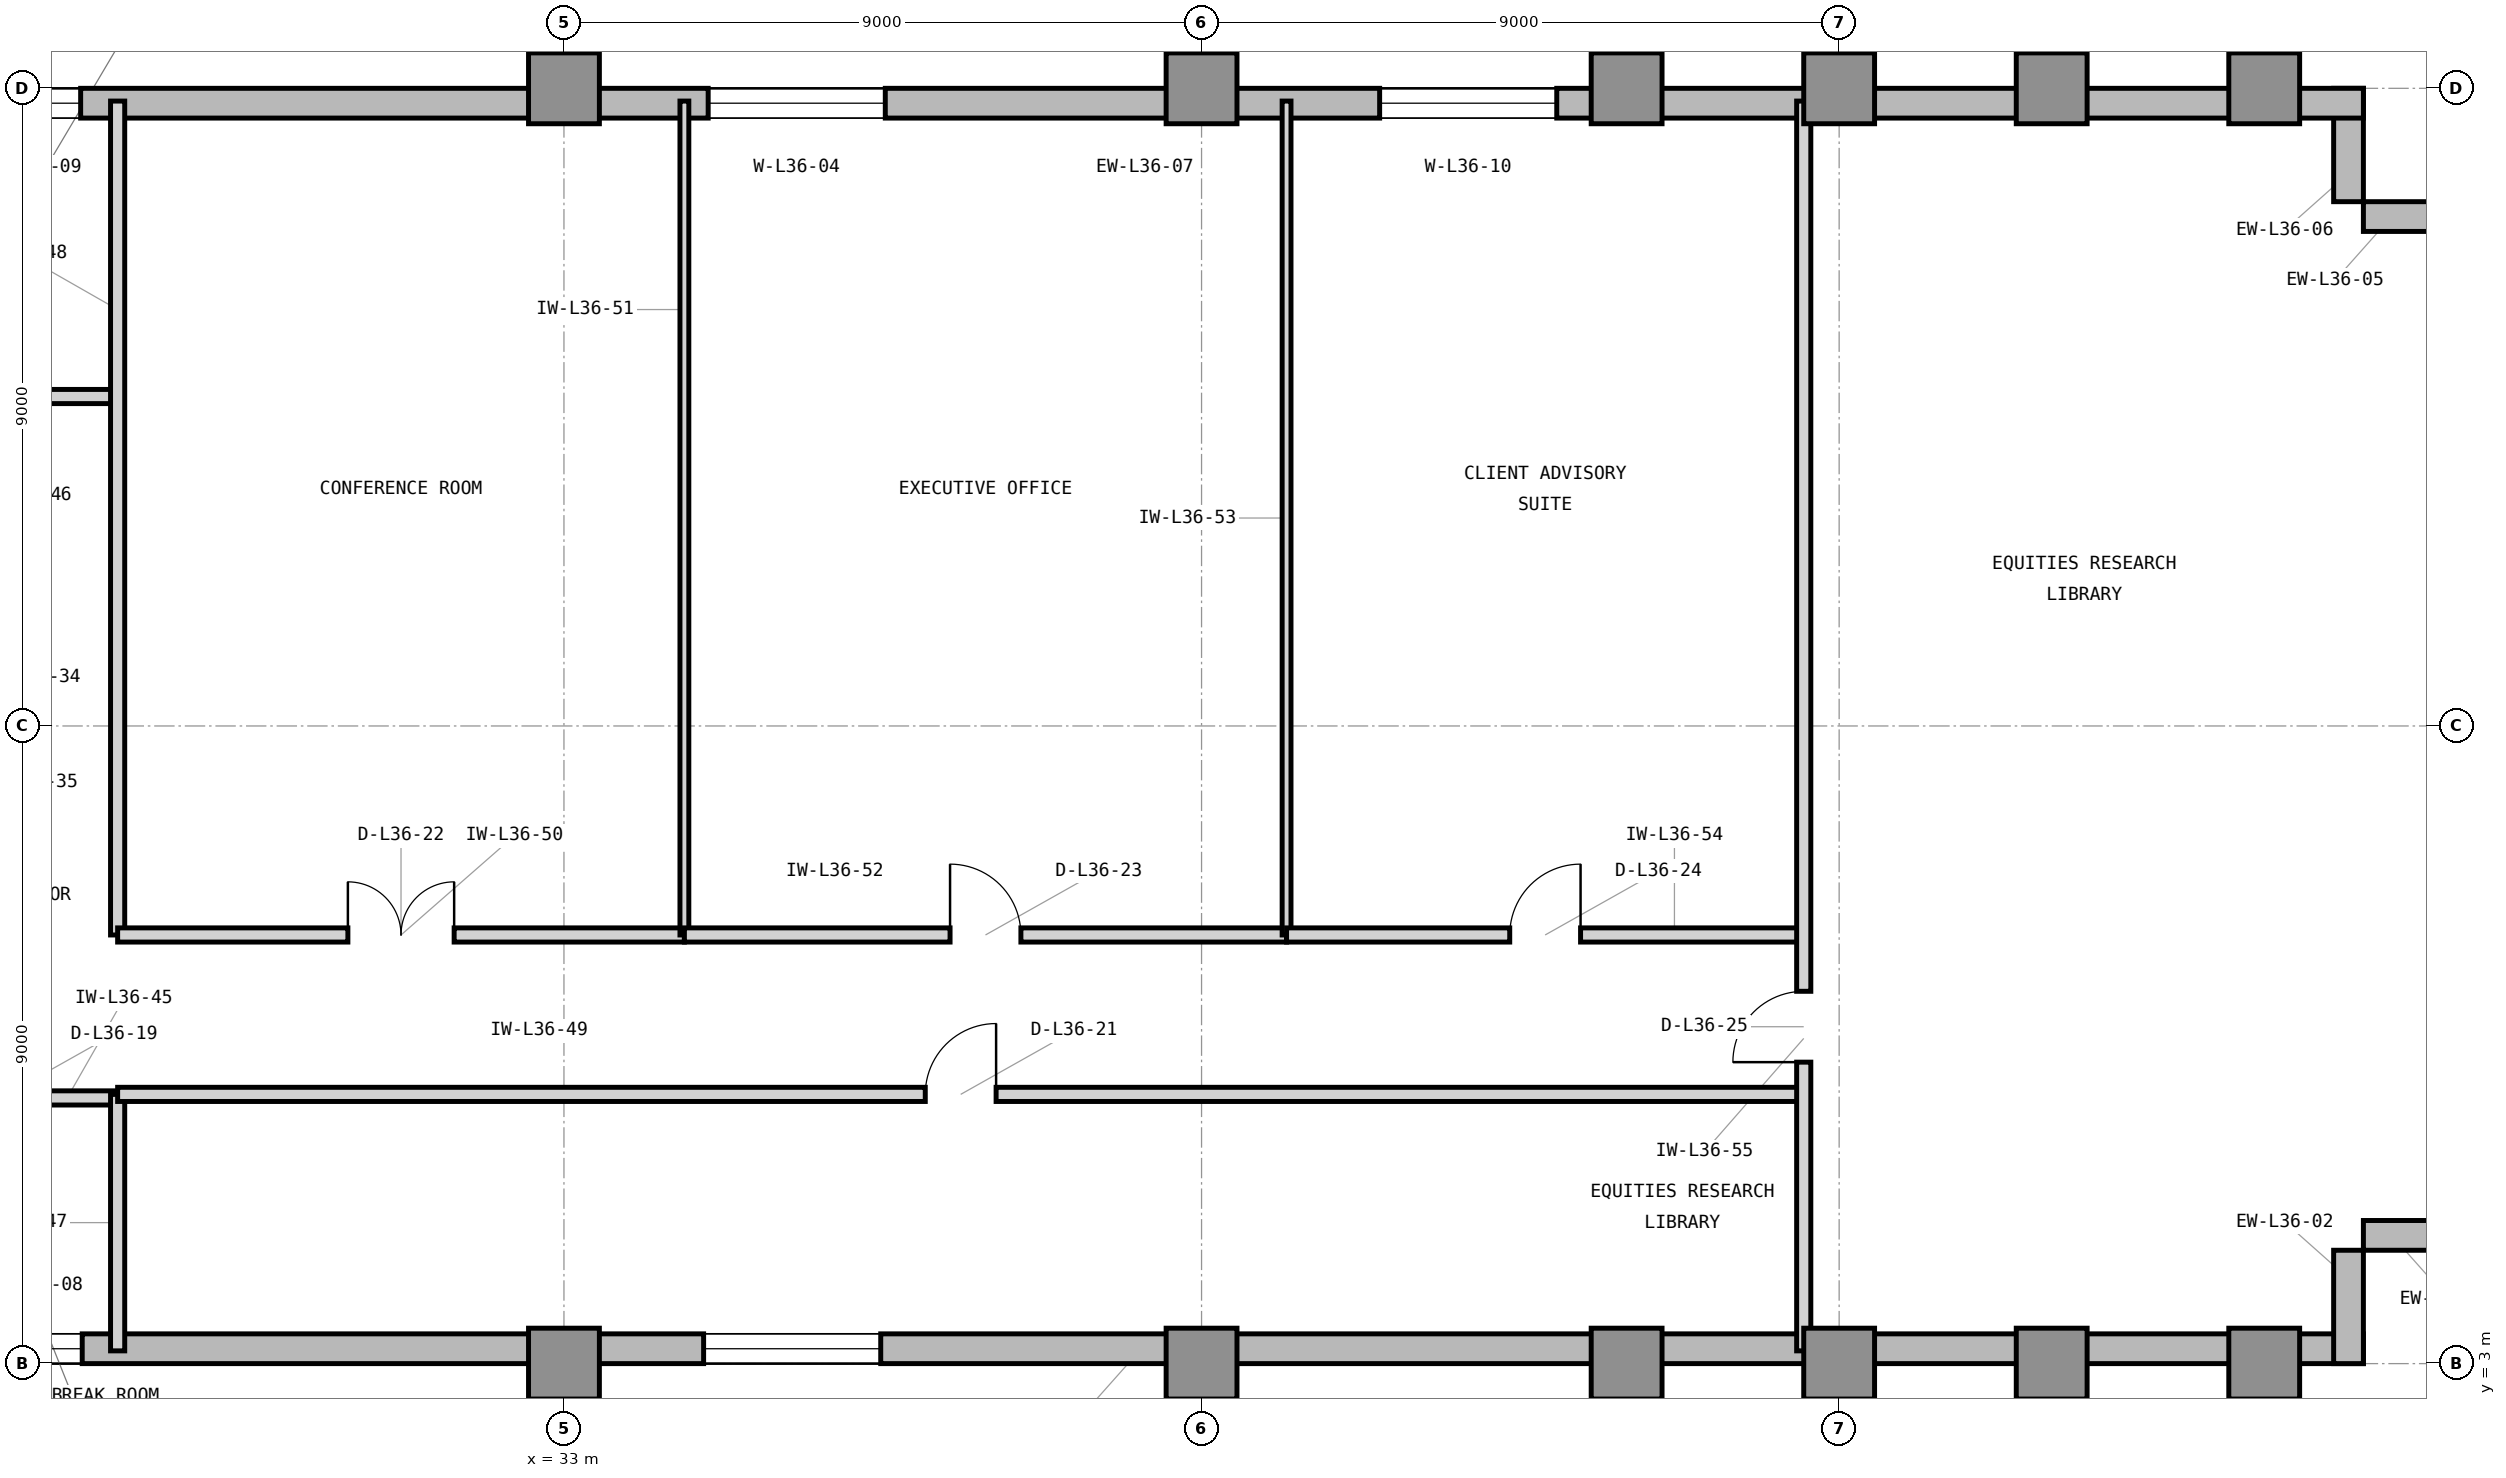
"""IFC4 building model, lengths in metres.
Left out: names, types, materials, properties, quantities, classifications, styles, units other than length and angle.
Written with IfcOpenShell. Run it as: python <this file> out.ifc"""

import sys

from ifc_helpers import new_model, si_unit, direction, frame, frame_2d, origin, origin_2d, place, context, subcontext, project, spatial, rectangle, extrude, element, fill, save


model = new_model("IFC4")
c1 = context("Model", 3, precision=1e-05, world=origin(), true_north=direction((0.0, 1.0)))
c2 = subcontext(c1, "Body", "Model", "MODEL_VIEW")
j1 = project(units=[si_unit("LENGTHUNIT", "METRE"), si_unit("PLANEANGLEUNIT", "RADIAN")], contexts=[c1])
p1 = place(None, origin())
s1 = spatial("IfcSite", under=j1, at=p1, CompositionType="ELEMENT")
p2 = place(p1, origin())
s2 = spatial("IfcBuilding", under=s1, at=p2, CompositionType="ELEMENT")
p3 = place(p2, frame((0.0, 0.0, 151.8)))
s3 = spatial("IfcBuildingStorey", under=s2, at=p3, CompositionType="ELEMENT", Elevation=151.8)
for number, where, z_axis, x_axis in (
    (1, (33.0, 3.0, 0.0), (0.0, 0.0, 1.0), (1.0, 0.0, 0.0)),
    (2, (33.0, 21.0, 0.0), (0.0, 0.0, 1.0), (1.0, 0.0, 0.0)),
    (3, (42.0, 3.0, 0.0), (0.0, 0.0, 1.0), (1.0, 0.0, 0.0)),
    (4, (42.0, 21.0, 0.0), (0.0, 0.0, 1.0), (1.0, 0.0, 0.0)),
    (5, (48.0, 3.0, 0.0), (0.0, 0.0, 1.0), (1.0, 0.0, 0.0)),
    (6, (48.0, 21.0, 0.0), (0.0, 0.0, 1.0), (1.0, 0.0, 0.0)),
    (7, (51.0, 3.0, 0.0), (0.0, 0.0, 1.0), (1.0, 0.0, 0.0)),
    (8, (51.0, 21.0, 0.0), (0.0, 0.0, 1.0), (1.0, 0.0, 0.0)),
    (9, (54.0, 3.0, 0.0), (0.0, 0.0, 1.0), (1.0, 0.0, 0.0)),
    (10, (54.0, 21.0, 0.0), (0.0, 0.0, 1.0), (1.0, 0.0, 0.0)),
    (11, (57.0, 3.0, 0.0), (0.0, 0.0, 1.0), (1.0, 0.0, 0.0)),
    (12, (57.0, 21.0, 0.0), (0.0, 0.0, 1.0), (1.0, 0.0, 0.0)),
):
    element("IfcColumn", number, at=place(p3, frame(where, z_axis=z_axis, x_axis=x_axis)), inside=s3, PredefinedType="COLUMN", context=c2, shape_type="SweptSolid", body=[
        extrude(rectangle(XDim=1.0, YDim=1.0, at=origin_2d()), origin(), (0.0, 0.0, 1.0), 3.9),
    ])
p4 = place(p3, frame((23.9, 3.21, 0.0), z_axis=(0.0, 0.0, 1.0), x_axis=(1.0, 0.0, 0.0)))
e13 = element("IfcWall", 13, at=p4, inside=s3, PredefinedType="STANDARD", context=c2, shape_type="SweptSolid", body=[
    extrude(rectangle(XDim=34.5, YDim=0.42, at=frame_2d((17.25, 0.0))), origin(), (0.0, 0.0, 1.0), 3.62),
])
p5 = place(p4, frame((11.071, 0.0, 0.85)))
e14 = element("IfcOpeningElement", 14, at=p5, cuts=e13, PredefinedType="OPENING", context=c2, shape_type="SweptSolid", body=[
    extrude(rectangle(XDim=2.5, YDim=2.25, at=frame_2d((1.25, 1.125))), frame((0.0, 0.22, 0.0), z_axis=(0.0, -1.0, 0.0), x_axis=(1.0, 0.0, 0.0)), (0.0, 0.0, 1.0), 0.44),
])
p6 = place(p4, frame((1.1, 0.0, 0.85)))
e15 = element("IfcOpeningElement", 15, at=p6, cuts=e13, PredefinedType="OPENING", context=c2, shape_type="SweptSolid", body=[
    extrude(rectangle(XDim=1.2, YDim=2.25, at=frame_2d((0.6, 1.125))), frame((0.0, 0.22, 0.0), z_axis=(0.0, -1.0, 0.0), x_axis=(1.0, 0.0, 0.0)), (0.0, 0.0, 1.0), 0.44),
])
for number, where, z_axis, x_axis in (
    (16, (58.19, 3.0, 0.0), (0.0, 0.0, 1.0), (0.0, 1.0, 0.0)),
    (17, (58.4, 4.81, 0.0), (0.0, 0.0, 1.0), (1.0, 0.0, 0.0)),
    (18, (60.0, 19.19, 0.0), (0.0, 0.0, 1.0), (-1.0, 0.0, 0.0)),
    (19, (58.19, 19.4, 0.0), (0.0, 0.0, 1.0), (0.0, 1.0, 0.0)),
):
    element("IfcWall", number, at=place(p3, frame(where, z_axis=z_axis, x_axis=x_axis)), inside=s3, PredefinedType="STANDARD", context=c2, shape_type="SweptSolid", body=[
        extrude(rectangle(XDim=1.6, YDim=0.42, at=frame_2d((0.8, 0.0))), origin(), (0.0, 0.0, 1.0), 3.62),
    ])
p7 = place(p3, frame((58.4, 20.79, 0.0), z_axis=(0.0, 0.0, 1.0), x_axis=(-1.0, 0.0, 0.0)))
e20 = element("IfcWall", 20, at=p7, inside=s3, PredefinedType="STANDARD", context=c2, shape_type="SweptSolid", body=[
    extrude(rectangle(XDim=34.4, YDim=0.42, at=frame_2d((17.2, 0.0))), origin(), (0.0, 0.0, 1.0), 3.62),
])
p8 = place(p7, frame((20.864, 0.0, 0.85)))
e21 = element("IfcOpeningElement", 21, at=p8, cuts=e20, PredefinedType="OPENING", context=c2, shape_type="SweptSolid", body=[
    extrude(rectangle(XDim=2.5, YDim=2.25, at=frame_2d((1.25, 1.125))), frame((0.0, 0.22, 0.0), z_axis=(0.0, -1.0, 0.0), x_axis=(1.0, 0.0, 0.0)), (0.0, 0.0, 1.0), 0.44),
])
p9 = place(p7, frame((32.222, 0.0, 0.85)))
e22 = element("IfcOpeningElement", 22, at=p9, cuts=e20, PredefinedType="OPENING", context=c2, shape_type="SweptSolid", body=[
    extrude(rectangle(XDim=1.2, YDim=2.25, at=frame_2d((0.6, 1.125))), frame((0.0, 0.22, 0.0), z_axis=(0.0, -1.0, 0.0), x_axis=(1.0, 0.0, 0.0)), (0.0, 0.0, 1.0), 0.44),
])
p10 = place(p7, frame((11.386, 0.0, 0.85)))
e23 = element("IfcOpeningElement", 23, at=p10, cuts=e20, PredefinedType="OPENING", context=c2, shape_type="SweptSolid", body=[
    extrude(rectangle(XDim=2.5, YDim=2.25, at=frame_2d((1.25, 1.125))), frame((0.0, 0.22, 0.0), z_axis=(0.0, -1.0, 0.0), x_axis=(1.0, 0.0, 0.0)), (0.0, 0.0, 1.0), 0.44),
])
p11 = place(p3, frame((23.85, 6.75, 0.0), z_axis=(0.0, 0.0, 1.0), x_axis=(1.0, 0.0, 0.0)))
e24 = element("IfcWall", 24, at=p11, inside=s3, PredefinedType="PARTITIONING", context=c2, shape_type="SweptSolid", body=[
    extrude(rectangle(XDim=2.85, YDim=0.2, at=frame_2d((1.425, 0.0))), origin(), (0.0, 0.0, 1.0), 3.61),
])
p12 = place(p11, frame((0.7, 0.0, 0.0)))
e25 = element("IfcOpeningElement", 25, at=p12, cuts=e24, PredefinedType="OPENING", context=c2, shape_type="SweptSolid", body=[
    extrude(rectangle(XDim=1.0, YDim=2.15, at=frame_2d((0.5, 1.075))), frame((0.0, 0.11, 0.0), z_axis=(0.0, -1.0, 0.0), x_axis=(1.0, 0.0, 0.0)), (0.0, 0.0, 1.0), 0.22),
])
p13 = place(p3, frame((23.85, 16.65, 0.0), z_axis=(0.0, 0.0, 1.0), x_axis=(1.0, 0.0, 0.0)))
e26 = element("IfcWall", 26, at=p13, inside=s3, PredefinedType="PARTITIONING", context=c2, shape_type="SweptSolid", body=[
    extrude(rectangle(XDim=2.85, YDim=0.2, at=frame_2d((1.425, 0.0))), origin(), (0.0, 0.0, 1.0), 3.61),
])
p14 = place(p13, frame((0.7, 0.0, 0.0)))
e27 = element("IfcOpeningElement", 27, at=p14, cuts=e26, PredefinedType="OPENING", context=c2, shape_type="SweptSolid", body=[
    extrude(rectangle(XDim=1.0, YDim=2.15, at=frame_2d((0.5, 1.075))), frame((0.0, 0.11, 0.0), z_axis=(0.0, -1.0, 0.0), x_axis=(1.0, 0.0, 0.0)), (0.0, 0.0, 1.0), 0.22),
])
p15 = place(p3, frame((26.7, 3.18, 0.0), z_axis=(0.0, 0.0, 1.0), x_axis=(0.0, 1.0, 0.0)))
e28 = element("IfcWall", 28, at=p15, inside=s3, PredefinedType="PARTITIONING", context=c2, shape_type="SweptSolid", body=[
    extrude(rectangle(XDim=3.62, YDim=0.2, at=frame_2d((1.81, 0.0))), origin(), (0.0, 0.0, 1.0), 3.61),
])
p16 = place(p3, frame((26.7, 9.05, 0.0), z_axis=(0.0, 0.0, 1.0), x_axis=(0.0, 1.0, 0.0)))
e29 = element("IfcWall", 29, at=p16, inside=s3, PredefinedType="PARTITIONING", context=c2, shape_type="SweptSolid", body=[
    extrude(rectangle(XDim=11.77, YDim=0.2, at=frame_2d((5.885, 0.0))), origin(), (0.0, 0.0, 1.0), 3.61),
])
p17 = place(p3, frame((26.7, 6.8, 0.0), z_axis=(0.0, 0.0, 1.0), x_axis=(1.0, 0.0, 0.0)))
e30 = element("IfcWall", 30, at=p17, inside=s3, PredefinedType="PARTITIONING", context=c2, shape_type="SweptSolid", body=[
    extrude(rectangle(XDim=23.8, YDim=0.2, at=frame_2d((11.9, 0.0))), origin(), (0.0, 0.0, 1.0), 3.61),
])
p18 = place(p17, frame((11.4, 0.0, 0.0)))
e31 = element("IfcOpeningElement", 31, at=p18, cuts=e30, PredefinedType="OPENING", context=c2, shape_type="SweptSolid", body=[
    extrude(rectangle(XDim=1.0, YDim=2.15, at=frame_2d((0.5, 1.075))), frame((0.0, 0.11, 0.0), z_axis=(0.0, -1.0, 0.0), x_axis=(1.0, 0.0, 0.0)), (0.0, 0.0, 1.0), 0.22),
])
p19 = place(p3, frame((26.7, 9.05, 0.0), z_axis=(0.0, 0.0, 1.0), x_axis=(1.0, 0.0, 0.0)))
e32 = element("IfcWall", 32, at=p19, inside=s3, PredefinedType="PARTITIONING", context=c2, shape_type="SweptSolid", body=[
    extrude(rectangle(XDim=8.0, YDim=0.2, at=frame_2d((4.0, 0.0))), origin(), (0.0, 0.0, 1.0), 3.066),
])
p20 = place(p19, frame((3.25, 0.0, 0.0)))
e33 = element("IfcOpeningElement", 33, at=p20, cuts=e32, PredefinedType="OPENING", context=c2, shape_type="SweptSolid", body=[
    extrude(rectangle(XDim=1.5, YDim=2.3, at=frame_2d((0.75, 1.15))), frame((0.0, 0.11, 0.0), z_axis=(0.0, -1.0, 0.0), x_axis=(1.0, 0.0, 0.0)), (0.0, 0.0, 1.0), 0.22),
])
p21 = place(p3, frame((34.7, 9.05, 0.0), z_axis=(0.0, 0.0, 1.0), x_axis=(0.0, 1.0, 0.0)))
e34 = element("IfcWall", 34, at=p21, inside=s3, PredefinedType="PARTITIONING", context=c2, shape_type="SweptSolid", body=[
    extrude(rectangle(XDim=11.77, YDim=0.125, at=frame_2d((5.885, 0.0))), origin(), (0.0, 0.0, 1.0), 3.61),
])
p22 = place(p3, frame((34.7, 9.05, 0.0), z_axis=(0.0, 0.0, 1.0), x_axis=(1.0, 0.0, 0.0)))
e35 = element("IfcWall", 35, at=p22, inside=s3, PredefinedType="PARTITIONING", context=c2, shape_type="SweptSolid", body=[
    extrude(rectangle(XDim=8.5, YDim=0.2, at=frame_2d((4.25, 0.0))), origin(), (0.0, 0.0, 1.0), 3.066),
])
p23 = place(p22, frame((3.75, 0.0, 0.0)))
e36 = element("IfcOpeningElement", 36, at=p23, cuts=e35, PredefinedType="OPENING", context=c2, shape_type="SweptSolid", body=[
    extrude(rectangle(XDim=1.0, YDim=2.15, at=frame_2d((0.5, 1.075))), frame((0.0, 0.11, 0.0), z_axis=(0.0, -1.0, 0.0), x_axis=(1.0, 0.0, 0.0)), (0.0, 0.0, 1.0), 0.22),
])
p24 = place(p3, frame((43.2, 9.05, 0.0), z_axis=(0.0, 0.0, 1.0), x_axis=(0.0, 1.0, 0.0)))
e37 = element("IfcWall", 37, at=p24, inside=s3, PredefinedType="PARTITIONING", context=c2, shape_type="SweptSolid", body=[
    extrude(rectangle(XDim=11.77, YDim=0.125, at=frame_2d((5.885, 0.0))), origin(), (0.0, 0.0, 1.0), 3.61),
])
p25 = place(p3, frame((43.2, 9.05, 0.0), z_axis=(0.0, 0.0, 1.0), x_axis=(1.0, 0.0, 0.0)))
e38 = element("IfcWall", 38, at=p25, inside=s3, PredefinedType="PARTITIONING", context=c2, shape_type="SweptSolid", body=[
    extrude(rectangle(XDim=7.3, YDim=0.2, at=frame_2d((3.65, 0.0))), origin(), (0.0, 0.0, 1.0), 3.066),
])
p26 = place(p25, frame((3.15, 0.0, 0.0)))
e39 = element("IfcOpeningElement", 39, at=p26, cuts=e38, PredefinedType="OPENING", context=c2, shape_type="SweptSolid", body=[
    extrude(rectangle(XDim=1.0, YDim=2.15, at=frame_2d((0.5, 1.075))), frame((0.0, 0.11, 0.0), z_axis=(0.0, -1.0, 0.0), x_axis=(1.0, 0.0, 0.0)), (0.0, 0.0, 1.0), 0.22),
])
p27 = place(p3, frame((50.5, 3.18, 0.0), z_axis=(0.0, 0.0, 1.0), x_axis=(0.0, 1.0, 0.0)))
e40 = element("IfcWall", 40, at=p27, inside=s3, PredefinedType="PARTITIONING", context=c2, shape_type="SweptSolid", body=[
    extrude(rectangle(XDim=17.64, YDim=0.2, at=frame_2d((8.82, 0.0))), origin(), (0.0, 0.0, 1.0), 3.61),
])
p28 = place(p27, frame((4.075, 0.0, 0.0)))
e41 = element("IfcOpeningElement", 41, at=p28, cuts=e40, PredefinedType="OPENING", context=c2, shape_type="SweptSolid", body=[
    extrude(rectangle(XDim=1.0, YDim=2.15, at=frame_2d((0.5, 1.075))), frame((0.0, 0.11, 0.0), z_axis=(0.0, -1.0, 0.0), x_axis=(1.0, 0.0, 0.0)), (0.0, 0.0, 1.0), 0.22),
])
p29 = place(p5, origin())
e42 = element("IfcWindow", 42, at=p29, inside=s3, PartitioningType="SINGLE_PANEL", PredefinedType="WINDOW", context=c2, shape_type="SweptSolid", body=[
    extrude(rectangle(XDim=2.5, YDim=2.25, at=frame_2d((1.25, 1.125))), frame((0.0, 0.11, 0.0), z_axis=(0.0, -1.0, 0.0), x_axis=(1.0, 0.0, 0.0)), (0.0, 0.0, 1.0), 0.06),
])
fill(e14, e42)
p30 = place(p8, origin())
e43 = element("IfcWindow", 43, at=p30, inside=s3, PartitioningType="SINGLE_PANEL", PredefinedType="WINDOW", context=c2, shape_type="SweptSolid", body=[
    extrude(rectangle(XDim=2.5, YDim=2.25, at=frame_2d((1.25, 1.125))), frame((0.0, 0.11, 0.0), z_axis=(0.0, -1.0, 0.0), x_axis=(1.0, 0.0, 0.0)), (0.0, 0.0, 1.0), 0.06),
])
fill(e21, e43)
p31 = place(p18, origin())
e44 = element("IfcDoor", 44, at=p31, inside=s3, OperationType="SINGLE_SWING_RIGHT", PredefinedType="DOOR", context=c2, shape_type="SweptSolid", body=[
    extrude(rectangle(XDim=1.0, YDim=2.15, at=frame_2d((0.5, 1.075))), frame((0.0, 0.025, 0.0), z_axis=(0.0, -1.0, 0.0), x_axis=(1.0, 0.0, 0.0)), (0.0, 0.0, 1.0), 0.05),
])
fill(e31, e44)
p32 = place(p20, origin())
e45 = element("IfcDoor", 45, at=p32, inside=s3, OperationType="DOUBLE_DOOR_SINGLE_SWING", PredefinedType="DOOR", context=c2, shape_type="SweptSolid", body=[
    extrude(rectangle(XDim=1.5, YDim=2.3, at=frame_2d((0.75, 1.15))), frame((0.0, 0.025, 0.0), z_axis=(0.0, -1.0, 0.0), x_axis=(1.0, 0.0, 0.0)), (0.0, 0.0, 1.0), 0.05),
])
fill(e33, e45)
p33 = place(p23, origin())
e46 = element("IfcDoor", 46, at=p33, inside=s3, OperationType="SINGLE_SWING_LEFT", PredefinedType="DOOR", context=c2, shape_type="SweptSolid", body=[
    extrude(rectangle(XDim=1.0, YDim=2.15, at=frame_2d((0.5, 1.075))), frame((0.0, 0.025, 0.0), z_axis=(0.0, -1.0, 0.0), x_axis=(1.0, 0.0, 0.0)), (0.0, 0.0, 1.0), 0.05),
])
fill(e36, e46)
p34 = place(p26, origin())
e47 = element("IfcDoor", 47, at=p34, inside=s3, OperationType="SINGLE_SWING_RIGHT", PredefinedType="DOOR", context=c2, shape_type="SweptSolid", body=[
    extrude(rectangle(XDim=1.0, YDim=2.15, at=frame_2d((0.5, 1.075))), frame((0.0, 0.025, 0.0), z_axis=(0.0, -1.0, 0.0), x_axis=(1.0, 0.0, 0.0)), (0.0, 0.0, 1.0), 0.05),
])
fill(e39, e47)
p35 = place(p28, origin())
e48 = element("IfcDoor", 48, at=p35, inside=s3, OperationType="SINGLE_SWING_LEFT", PredefinedType="DOOR", context=c2, shape_type="SweptSolid", body=[
    extrude(rectangle(XDim=1.0, YDim=2.15, at=frame_2d((0.5, 1.075))), frame((0.0, 0.025, 0.0), z_axis=(0.0, -1.0, 0.0), x_axis=(1.0, 0.0, 0.0)), (0.0, 0.0, 1.0), 0.05),
])
fill(e41, e48)
p36 = place(p6, origin())
e49 = element("IfcWindow", 49, at=p36, inside=s3, PartitioningType="SINGLE_PANEL", PredefinedType="WINDOW", context=c2, shape_type="SweptSolid", body=[
    extrude(rectangle(XDim=1.2, YDim=2.25, at=frame_2d((0.6, 1.125))), frame((0.0, 0.11, 0.0), z_axis=(0.0, -1.0, 0.0), x_axis=(1.0, 0.0, 0.0)), (0.0, 0.0, 1.0), 0.06),
])
fill(e15, e49)
p37 = place(p9, origin())
e50 = element("IfcWindow", 50, at=p37, inside=s3, PartitioningType="SINGLE_PANEL", PredefinedType="WINDOW", context=c2, shape_type="SweptSolid", body=[
    extrude(rectangle(XDim=1.2, YDim=2.25, at=frame_2d((0.6, 1.125))), frame((0.0, 0.11, 0.0), z_axis=(0.0, -1.0, 0.0), x_axis=(1.0, 0.0, 0.0)), (0.0, 0.0, 1.0), 0.06),
])
fill(e22, e50)
p38 = place(p10, origin())
e51 = element("IfcWindow", 51, at=p38, inside=s3, PartitioningType="SINGLE_PANEL", PredefinedType="WINDOW", context=c2, shape_type="SweptSolid", body=[
    extrude(rectangle(XDim=2.5, YDim=2.25, at=frame_2d((1.25, 1.125))), frame((0.0, 0.11, 0.0), z_axis=(0.0, -1.0, 0.0), x_axis=(1.0, 0.0, 0.0)), (0.0, 0.0, 1.0), 0.06),
])
fill(e23, e51)
save(model, sys.argv[1])
